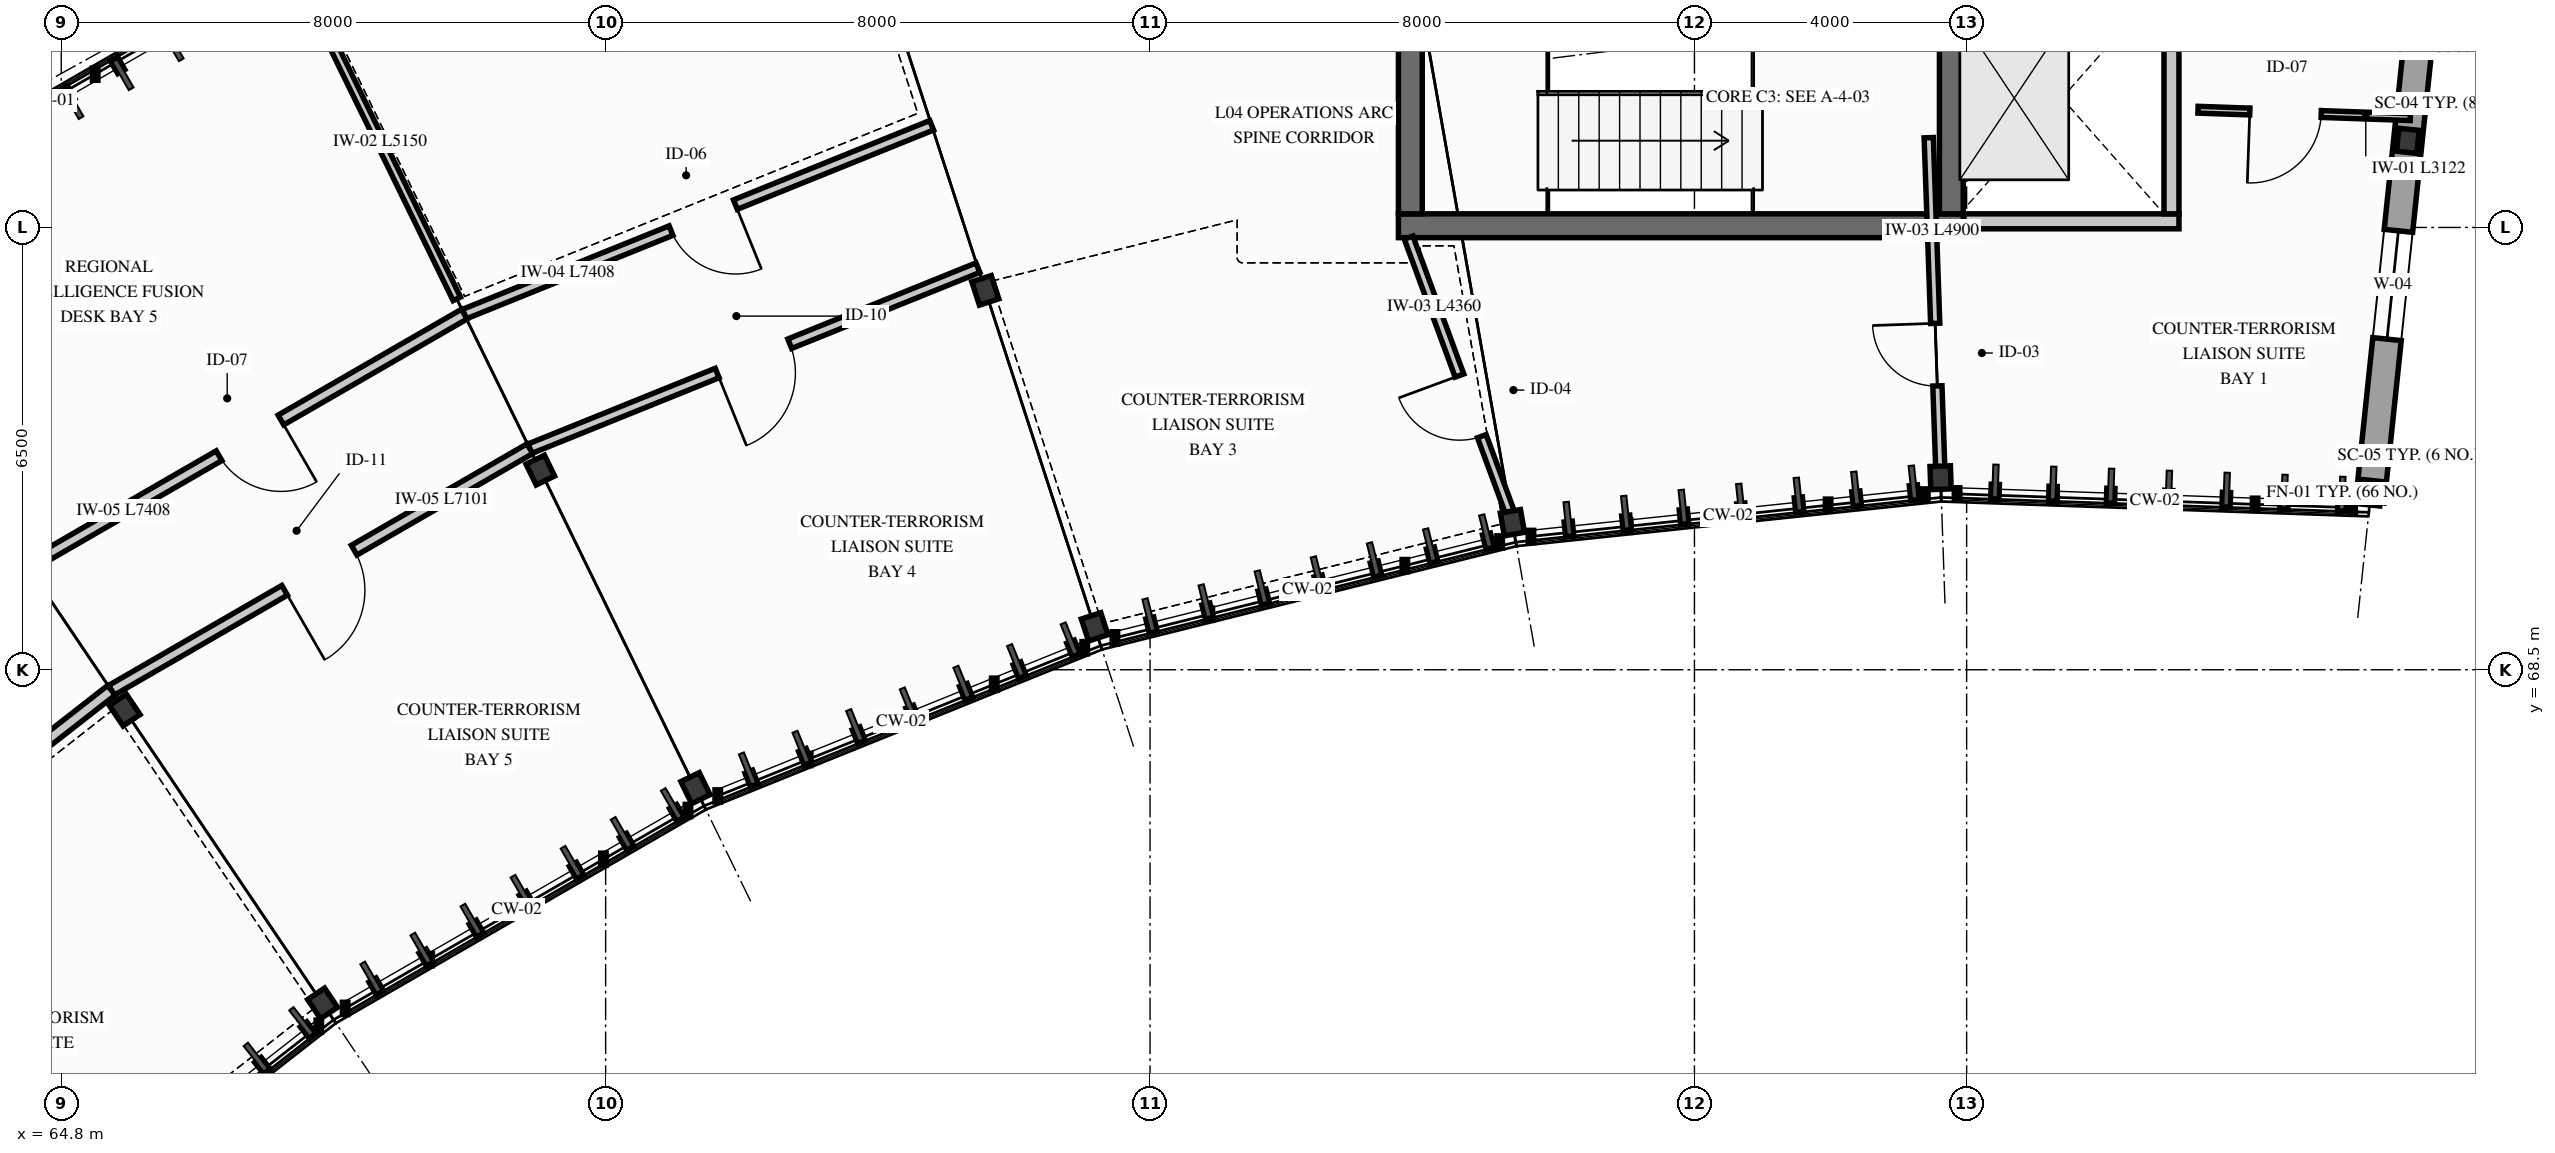
"""IFC4 building model, lengths in metres.
Left out: names, types, materials, properties, quantities, classifications, styles, units other than length and angle.
Written with IfcOpenShell. Run it as: python <this file> out.ifc"""

import sys

from ifc_helpers import new_model, si_unit, direction, frame, frame_2d, origin, origin_2d, place, context, subcontext, project, spatial, rectangle, i_section, extrude, element, fill, save


model = new_model("IFC4")
c1 = context("Model", 3, precision=1e-05, world=origin(), true_north=direction((0.0, 1.0)))
c2 = subcontext(c1, "Body", "Model", "MODEL_VIEW")
j1 = project(units=[si_unit("LENGTHUNIT", "METRE"), si_unit("PLANEANGLEUNIT", "RADIAN")], contexts=[c1])
p1 = place(None, origin())
s1 = spatial("IfcSite", under=j1, at=p1, CompositionType="ELEMENT")
p2 = place(p1, origin())
s2 = spatial("IfcBuilding", under=s1, at=p2, CompositionType="ELEMENT")
p3 = place(p2, frame((0.0, 0.0, 17.7)))
s3 = spatial("IfcBuildingStorey", under=s2, at=p3, CompositionType="ELEMENT", Elevation=17.7)
p4 = place(p3, frame((84.45, 75.025, 0.0), z_axis=(0.0, 0.0, 1.0), x_axis=(1.0, 0.0, 0.0)))
e1 = element("IfcWall", 1, at=p4, inside=s3, PredefinedType="SHEAR", context=c2, shape_type="SweptSolid", body=[
    extrude(rectangle(XDim=8.3, YDim=0.35, at=frame_2d((4.15, 0.0))), origin(), (0.0, 0.0, 1.0), 3.7),
])
p5 = place(p3, frame((84.625, 75.2, 0.0), z_axis=(0.0, 0.0, 1.0), x_axis=(0.0, 1.0, 0.0)))
e2 = element("IfcWall", 2, at=p5, inside=s3, PredefinedType="SHEAR", context=c2, shape_type="SweptSolid", body=[
    extrude(rectangle(XDim=6.8, YDim=0.35, at=frame_2d((3.4, 0.0))), origin(), (0.0, 0.0, 1.0), 3.7),
])
p6 = place(p5, frame((2.6, 0.0, 0.0)))
e3 = element("IfcOpeningElement", 3, at=p6, cuts=e2, PredefinedType="OPENING", context=c2, shape_type="SweptSolid", body=[
    extrude(rectangle(XDim=1.25, YDim=2.2, at=frame_2d((0.625, 1.1))), frame((0.0, 0.185, 0.0), z_axis=(0.0, -1.0, 0.0), x_axis=(1.0, 0.0, 0.0)), (0.0, 0.0, 1.0), 0.37),
])
p7 = place(p3, frame((92.575, 75.2, 0.0), z_axis=(0.0, 0.0, 1.0), x_axis=(0.0, 1.0, 0.0)))
e4 = element("IfcWall", 4, at=p7, inside=s3, PredefinedType="SHEAR", context=c2, shape_type="SweptSolid", body=[
    extrude(rectangle(XDim=6.8, YDim=0.35, at=frame_2d((3.4, 0.0))), origin(), (0.0, 0.0, 1.0), 3.7),
])
p8 = place(p3, frame((98.74, 71.102, 0.0), z_axis=(0.0, 0.0, 1.0), x_axis=(0.994521895368, -0.104528463268, 0.0)))
e5 = element("IfcColumn", 5, at=p8, inside=s3, PredefinedType="COLUMN", context=c2, shape_type="SweptSolid", body=[
    extrude(i_section(OverallWidth=0.3, OverallDepth=0.36, WebThickness=0.012, FlangeThickness=0.022, FilletRadius=0.027, at=origin_2d()), origin(), (0.0, 0.0, 1.0), 3.9),
])
for number, where, z_axis, x_axis in (
    (6, (99.284, 76.273, 0.0), (0.0, 0.0, 1.0), (0.995, -0.105, 0.0)),
    (7, (92.417, 71.323, 0.0), (0.0, 0.0, 1.0), (0.999, 0.035, 0.0)),
    (8, (86.125, 70.661, 0.0), (0.0, 0.0, 1.0), (0.985, 0.174, 0.0)),
    (9, (79.986, 69.13, 0.0), (0.0, 0.0, 1.0), (0.951, 0.309, 0.0)),
):
    element("IfcColumn", number, at=place(p3, frame(where, z_axis=z_axis, x_axis=x_axis)), inside=s3, PredefinedType="COLUMN", context=c2, shape_type="SweptSolid", body=[
        extrude(i_section(OverallWidth=0.3, OverallDepth=0.34, WebThickness=0.012, FlangeThickness=0.021, FilletRadius=0.027, at=origin_2d()), origin(), (0.0, 0.0, 1.0), 3.9),
    ])
for number, where, z_axis, x_axis in (
    (10, (78.379, 74.076, 0.0), (0.0, 0.0, 1.0), (0.951, 0.309, 0.0)),
    (11, (74.12, 66.76, 0.0), (0.0, 0.0, 1.0), (0.899, 0.438, 0.0)),
):
    element("IfcColumn", number, at=place(p3, frame(where, z_axis=z_axis, x_axis=x_axis)), inside=s3, PredefinedType="COLUMN", context=c2, shape_type="SweptSolid", body=[
        extrude(i_section(OverallWidth=0.3, OverallDepth=0.36, WebThickness=0.012, FlangeThickness=0.022, FilletRadius=0.027, at=origin_2d()), origin(), (0.0, 0.0, 1.0), 3.9),
    ])
for number, where, z_axis, x_axis in (
    (12, (71.84, 71.434, 0.0), (0.0, 0.0, 1.0), (0.899, 0.438, 0.0)),
    (13, (68.641, 63.597, 0.0), (0.0, 0.0, 1.0), (0.829, 0.559, 0.0)),
):
    element("IfcColumn", number, at=place(p3, frame(where, z_axis=z_axis, x_axis=x_axis)), inside=s3, PredefinedType="COLUMN", context=c2, shape_type="SweptSolid", body=[
        extrude(i_section(OverallWidth=0.3, OverallDepth=0.34, WebThickness=0.012, FlangeThickness=0.021, FilletRadius=0.027, at=origin_2d()), origin(), (0.0, 0.0, 1.0), 3.9),
    ])
p9 = place(p3, frame((65.733, 67.908, 0.0), z_axis=(0.0, 0.0, 1.0), x_axis=(0.829037572555, 0.559192903471, 0.0)))
e14 = element("IfcColumn", 14, at=p9, inside=s3, PredefinedType="COLUMN", context=c2, shape_type="SweptSolid", body=[
    extrude(i_section(OverallWidth=0.3, OverallDepth=0.36, WebThickness=0.012, FlangeThickness=0.022, FilletRadius=0.027, at=origin_2d()), origin(), (0.0, 0.0, 1.0), 3.9),
])
p10 = place(p3, frame((98.727, 70.972, 0.0), z_axis=(0.0, 0.0, 1.0), x_axis=(0.104534827036, 0.994521226489, 0.0)))
e15 = element("IfcWall", 15, at=p10, inside=s3, PredefinedType="SOLIDWALL", context=c2, shape_type="SweptSolid", body=[
    extrude(rectangle(XDim=13.56, YDim=0.42, at=frame_2d((6.78, 0.0))), origin(), (0.0, 0.0, 1.0), 3.25),
])
p11 = place(p10, frame((2.4, 0.0, 0.71)))
e16 = element("IfcOpeningElement", 16, at=p11, cuts=e15, PredefinedType="OPENING", context=c2, shape_type="SweptSolid", body=[
    extrude(rectangle(XDim=1.6, YDim=2.4, at=frame_2d((0.8, 1.2))), frame((0.0, 0.22, 0.0), z_axis=(0.0, -1.0, 0.0), x_axis=(1.0, 0.0, 0.0)), (0.0, 0.0, 1.0), 0.44),
])
p12 = place(p10, frame((9.4, 0.0, 0.71)))
e17 = element("IfcOpeningElement", 17, at=p12, cuts=e15, PredefinedType="OPENING", context=c2, shape_type="SweptSolid", body=[
    extrude(rectangle(XDim=1.6, YDim=2.4, at=frame_2d((0.8, 1.2))), frame((0.0, 0.22, 0.0), z_axis=(0.0, -1.0, 0.0), x_axis=(1.0, 0.0, 0.0)), (0.0, 0.0, 1.0), 0.44),
])
p13 = place(p3, frame((92.76, 75.09, 0.0), z_axis=(0.0, 0.0, 1.0), x_axis=(1.0, 0.0, 0.0)))
e18 = element("IfcWall", 18, at=p13, inside=s3, PredefinedType="PARTITIONING", context=c2, shape_type="SweptSolid", body=[
    extrude(rectangle(XDim=3.16, YDim=0.22, at=frame_2d((1.58, 0.0))), origin(), (0.0, 0.0, 1.0), 3.68),
])
p14 = place(p3, frame((95.81, 75.2, 0.0), z_axis=(0.0, 0.0, 1.0), x_axis=(0.0, 1.0, 0.0)))
e19 = element("IfcWall", 19, at=p14, inside=s3, PredefinedType="PARTITIONING", context=c2, shape_type="SweptSolid", body=[
    extrude(rectangle(XDim=3.4, YDim=0.22, at=frame_2d((1.7, 0.0))), origin(), (0.0, 0.0, 1.0), 3.68),
])
p15 = place(p3, frame((92.414, 71.422, 0.0), z_axis=(0.0, 0.0, 1.0), x_axis=(-0.034877560821, 0.999391592796, 0.0)))
e20 = element("IfcWall", 20, at=p15, inside=s3, PredefinedType="PARTITIONING", context=c2, shape_type="SweptSolid", body=[
    extrude(rectangle(XDim=4.9, YDim=0.135, at=frame_2d((2.45, 0.0))), origin(), (0.0, 0.0, 1.0), 3.68),
])
p16 = place(p15, frame((1.25, 0.0, 0.0)))
e21 = element("IfcOpeningElement", 21, at=p16, cuts=e20, PredefinedType="OPENING", context=c2, shape_type="SweptSolid", body=[
    extrude(rectangle(XDim=0.92, YDim=2.12, at=frame_2d((0.46, 1.06))), frame((0.0, 0.077, 0.0), z_axis=(0.0, -1.0, 0.0), x_axis=(1.0, 0.0, 0.0)), (0.0, 0.0, 1.0), 0.155),
])
p17 = place(p3, frame((86.108, 70.76, 0.0), z_axis=(0.0, 0.0, 1.0), x_axis=(-0.345809164341, 0.938304866159, 0.0)))
e22 = element("IfcWall", 22, at=p17, inside=s3, PredefinedType="PARTITIONING", context=c2, shape_type="SweptSolid", body=[
    extrude(rectangle(XDim=4.36, YDim=0.135, at=frame_2d((2.18, 0.0))), origin(), (0.0, 0.0, 1.0), 3.68),
])
p18 = place(p17, frame((1.25, 0.0, 0.0)))
e23 = element("IfcOpeningElement", 23, at=p18, cuts=e22, PredefinedType="OPENING", context=c2, shape_type="SweptSolid", body=[
    extrude(rectangle(XDim=0.95, YDim=2.15, at=frame_2d((0.475, 1.075))), frame((0.0, 0.077, 0.0), z_axis=(0.0, -1.0, 0.0), x_axis=(1.0, 0.0, 0.0)), (0.0, 0.0, 1.0), 0.155),
])
p19 = place(p3, frame((99.321, 76.621, 0.0), z_axis=(0.0, 0.0, 1.0), x_axis=(-0.999389073029, 0.034949688284, 0.0)))
e24 = element("IfcWall", 24, at=p19, inside=s3, PredefinedType="PARTITIONING", context=c2, shape_type="SweptSolid", body=[
    extrude(rectangle(XDim=3.123, YDim=0.1, at=frame_2d((1.561, 0.0))), origin(), (0.0, 0.0, 1.0), 3.68),
])
p20 = place(p19, frame((1.311, 0.0, 0.0)))
e25 = element("IfcOpeningElement", 25, at=p20, cuts=e24, PredefinedType="OPENING", context=c2, shape_type="SweptSolid", body=[
    extrude(rectangle(XDim=1.05, YDim=2.2, at=frame_2d((0.525, 1.1))), frame((0.0, 0.06, 0.0), z_axis=(0.0, -1.0, 0.0), x_axis=(1.0, 0.0, 0.0)), (0.0, 0.0, 1.0), 0.12),
])
p21 = place(p3, frame((78.271, 74.409, 0.0), z_axis=(0.0, 0.0, 1.0), x_axis=(-0.927181218568, -0.374613117677, 0.0)))
e26 = element("IfcWall", 26, at=p21, inside=s3, PredefinedType="PARTITIONING", context=c2, shape_type="SweptSolid", body=[
    extrude(rectangle(XDim=7.101, YDim=0.15, at=frame_2d((3.551, 0.0))), origin(), (0.0, 0.0, 1.0), 3.68),
])
p22 = place(p21, frame((2.983, 0.0, 0.0)))
e27 = element("IfcOpeningElement", 27, at=p22, cuts=e26, PredefinedType="OPENING", context=c2, shape_type="SweptSolid", body=[
    extrude(rectangle(XDim=1.15, YDim=2.2, at=frame_2d((0.575, 1.1))), frame((0.0, 0.085, 0.0), z_axis=(0.0, -1.0, 0.0), x_axis=(1.0, 0.0, 0.0)), (0.0, 0.0, 1.0), 0.17),
])
p23 = place(p3, frame((77.591, 76.501, 0.0), z_axis=(0.0, 0.0, 1.0), x_axis=(-0.927187035022, -0.374598721418, 0.0)))
e28 = element("IfcWall", 28, at=p23, inside=s3, PredefinedType="PARTITIONING", context=c2, shape_type="SweptSolid", body=[
    extrude(rectangle(XDim=7.408, YDim=0.15, at=frame_2d((3.704, 0.0))), origin(), (0.0, 0.0, 1.0), 3.68),
])
p24 = place(p23, frame((3.111, 0.0, 0.0)))
e29 = element("IfcOpeningElement", 29, at=p24, cuts=e28, PredefinedType="OPENING", context=c2, shape_type="SweptSolid", body=[
    extrude(rectangle(XDim=1.02, YDim=2.18, at=frame_2d((0.51, 1.09))), frame((0.0, 0.085, 0.0), z_axis=(0.0, -1.0, 0.0), x_axis=(1.0, 0.0, 0.0)), (0.0, 0.0, 1.0), 0.17),
])
p25 = place(p3, frame((70.613, 73.951, 0.0), z_axis=(0.0, 0.0, 1.0), x_axis=(-0.438355450259, 0.898801701839, 0.0)))
e30 = element("IfcWall", 30, at=p25, inside=s3, PredefinedType="PARTITIONING", context=c2, shape_type="SweptSolid", body=[
    extrude(rectangle(XDim=5.15, YDim=0.12, at=frame_2d((2.575, 0.0))), origin(), (0.0, 0.0, 1.0), 3.25),
])
p26 = place(p3, frame((71.687, 71.749, 0.0), z_axis=(0.0, 0.0, 1.0), x_axis=(-0.866032151687, -0.499988312107, 0.0)))
e31 = element("IfcWall", 31, at=p26, inside=s3, PredefinedType="PARTITIONING", context=c2, shape_type="SweptSolid", body=[
    extrude(rectangle(XDim=7.101, YDim=0.165, at=frame_2d((3.551, 0.0))), origin(), (0.0, 0.0, 1.0), 3.68),
])
p27 = place(p26, frame((2.982, 0.0, 0.0)))
e32 = element("IfcOpeningElement", 32, at=p27, cuts=e31, PredefinedType="OPENING", context=c2, shape_type="SweptSolid", body=[
    extrude(rectangle(XDim=1.18, YDim=2.24, at=frame_2d((0.59, 1.12))), frame((0.0, 0.093, 0.0), z_axis=(0.0, -1.0, 0.0), x_axis=(1.0, 0.0, 0.0)), (0.0, 0.0, 1.0), 0.185),
])
p28 = place(p3, frame((70.722, 73.726, 0.0), z_axis=(0.0, 0.0, 1.0), x_axis=(-0.866019843608, -0.500009630384, 0.0)))
e33 = element("IfcWall", 33, at=p28, inside=s3, PredefinedType="PARTITIONING", context=c2, shape_type="SweptSolid", body=[
    extrude(rectangle(XDim=7.408, YDim=0.165, at=frame_2d((3.704, 0.0))), origin(), (0.0, 0.0, 1.0), 3.68),
])
p29 = place(p28, frame((3.111, 0.0, 0.0)))
e34 = element("IfcOpeningElement", 34, at=p29, cuts=e33, PredefinedType="OPENING", context=c2, shape_type="SweptSolid", body=[
    extrude(rectangle(XDim=1.05, YDim=2.2, at=frame_2d((0.525, 1.1))), frame((0.0, 0.093, 0.0), z_axis=(0.0, -1.0, 0.0), x_axis=(1.0, 0.0, 0.0)), (0.0, 0.0, 1.0), 0.185),
])
p30 = place(p3, frame((65.537, 68.198, 0.0), z_axis=(0.0, 0.0, 1.0), x_axis=(-0.788011863809, -0.615660054329, 0.0)))
e35 = element("IfcWall", 35, at=p30, inside=s3, PredefinedType="PARTITIONING", context=c2, shape_type="SweptSolid", body=[
    extrude(rectangle(XDim=7.101, YDim=0.18, at=frame_2d((3.551, 0.0))), origin(), (0.0, 0.0, 1.0), 3.68),
])
p31 = place(p30, frame((2.982, 0.0, 0.0)))
e36 = element("IfcOpeningElement", 36, at=p31, cuts=e35, PredefinedType="OPENING", context=c2, shape_type="SweptSolid", body=[
    extrude(rectangle(XDim=0.88, YDim=2.1, at=frame_2d((0.44, 1.05))), frame((0.0, 0.1, 0.0), z_axis=(0.0, -1.0, 0.0), x_axis=(1.0, 0.0, 0.0)), (0.0, 0.0, 1.0), 0.2),
])
p32 = place(p11, origin())
e37 = element("IfcWindow", 37, at=p32, inside=s3, PartitioningType="SINGLE_PANEL", PredefinedType="WINDOW", context=c2, shape_type="SweptSolid", body=[
    extrude(rectangle(XDim=1.6, YDim=2.4, at=frame_2d((0.8, 1.2))), frame((0.0, 0.03, 0.0), z_axis=(0.0, -1.0, 0.0), x_axis=(1.0, 0.0, 0.0)), (0.0, 0.0, 1.0), 0.06),
])
fill(e16, e37)
p33 = place(p16, origin())
e38 = element("IfcDoor", 38, at=p33, inside=s3, OperationType="SINGLE_SWING_RIGHT", PredefinedType="DOOR", context=c2, shape_type="SweptSolid", body=[
    extrude(rectangle(XDim=0.92, YDim=2.12, at=frame_2d((0.46, 1.06))), frame((0.0, 0.025, 0.0), z_axis=(0.0, -1.0, 0.0), x_axis=(1.0, 0.0, 0.0)), (0.0, 0.0, 1.0), 0.05),
])
fill(e21, e38)
p34 = place(p18, origin())
e39 = element("IfcDoor", 39, at=p34, inside=s3, OperationType="SINGLE_SWING_RIGHT", PredefinedType="DOOR", context=c2, shape_type="SweptSolid", body=[
    extrude(rectangle(XDim=0.95, YDim=2.15, at=frame_2d((0.475, 1.075))), frame((0.0, 0.025, 0.0), z_axis=(0.0, -1.0, 0.0), x_axis=(1.0, 0.0, 0.0)), (0.0, 0.0, 1.0), 0.05),
])
fill(e23, e39)
p35 = place(p20, origin())
e40 = element("IfcDoor", 40, at=p35, inside=s3, OperationType="SINGLE_SWING_RIGHT", PredefinedType="DOOR", context=c2, shape_type="SweptSolid", body=[
    extrude(rectangle(XDim=1.05, YDim=2.2, at=frame_2d((0.525, 1.1))), frame((0.0, 0.025, 0.0), z_axis=(0.0, -1.0, 0.0), x_axis=(1.0, 0.0, 0.0)), (0.0, 0.0, 1.0), 0.05),
])
fill(e25, e40)
p36 = place(p22, origin())
e41 = element("IfcDoor", 41, at=p36, inside=s3, OperationType="SINGLE_SWING_RIGHT", PredefinedType="DOOR", context=c2, shape_type="SweptSolid", body=[
    extrude(rectangle(XDim=1.15, YDim=2.2, at=frame_2d((0.575, 1.1))), frame((0.0, 0.025, 0.0), z_axis=(0.0, -1.0, 0.0), x_axis=(1.0, 0.0, 0.0)), (0.0, 0.0, 1.0), 0.05),
])
fill(e27, e41)
p37 = place(p24, origin())
e42 = element("IfcDoor", 42, at=p37, inside=s3, OperationType="SINGLE_SWING_LEFT", PredefinedType="DOOR", context=c2, shape_type="SweptSolid", body=[
    extrude(rectangle(XDim=1.02, YDim=2.18, at=frame_2d((0.51, 1.09))), frame((0.0, 0.025, 0.0), z_axis=(0.0, -1.0, 0.0), x_axis=(1.0, 0.0, 0.0)), (0.0, 0.0, 1.0), 0.05),
])
fill(e29, e42)
p38 = place(p27, origin())
e43 = element("IfcDoor", 43, at=p38, inside=s3, OperationType="SINGLE_SWING_RIGHT", PredefinedType="DOOR", context=c2, shape_type="SweptSolid", body=[
    extrude(rectangle(XDim=1.18, YDim=2.24, at=frame_2d((0.59, 1.12))), frame((0.0, 0.025, 0.0), z_axis=(0.0, -1.0, 0.0), x_axis=(1.0, 0.0, 0.0)), (0.0, 0.0, 1.0), 0.05),
])
fill(e32, e43)
p39 = place(p29, origin())
e44 = element("IfcDoor", 44, at=p39, inside=s3, OperationType="SINGLE_SWING_LEFT", PredefinedType="DOOR", context=c2, shape_type="SweptSolid", body=[
    extrude(rectangle(XDim=1.05, YDim=2.2, at=frame_2d((0.525, 1.1))), frame((0.0, 0.025, 0.0), z_axis=(0.0, -1.0, 0.0), x_axis=(1.0, 0.0, 0.0)), (0.0, 0.0, 1.0), 0.05),
])
fill(e34, e44)
save(model, sys.argv[1])
